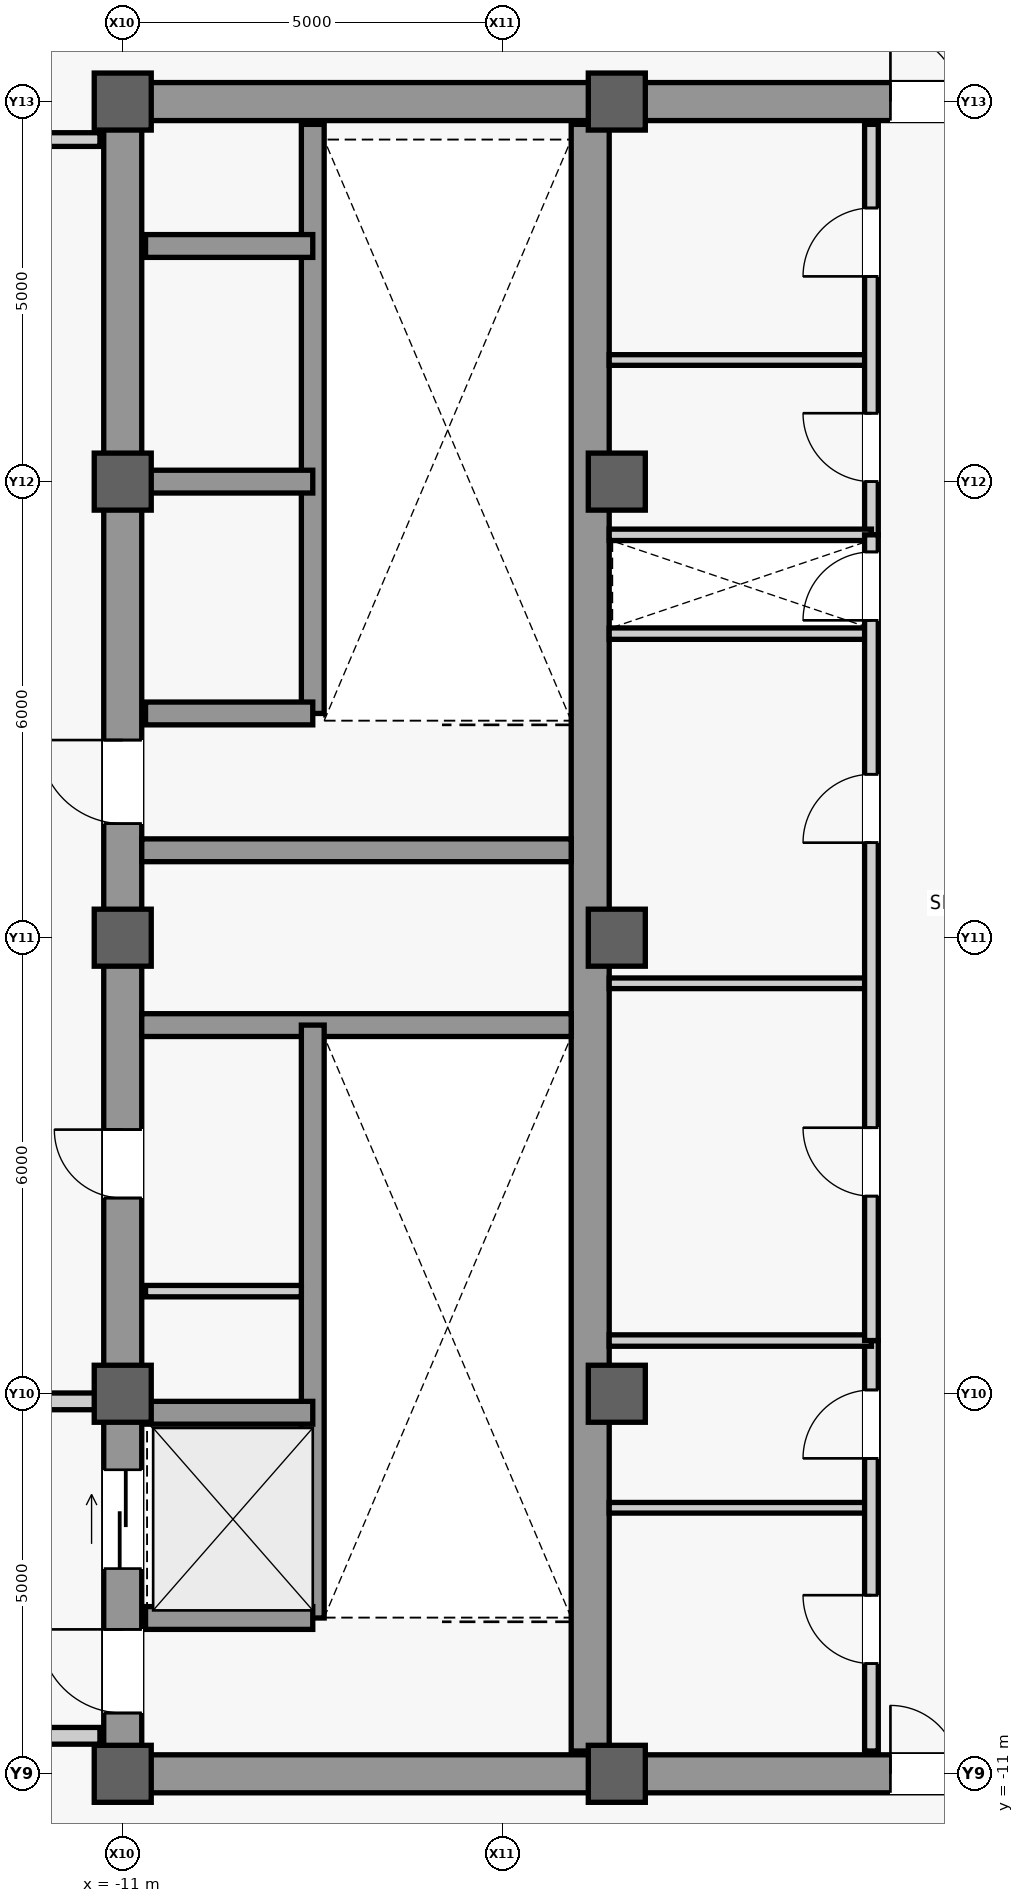
"""IFC4 building model, lengths in metres.
Left out: names, types, materials, properties, quantities, classifications, styles, units other than length and angle.
Written with IfcOpenShell. Run it as: python <this file> out.ifc"""

import sys

from ifc_helpers import new_model, si_unit, direction, frame, frame_2d, origin, origin_2d, place, context, subcontext, project, spatial, rectangle, extrude, source, transform, mapped, element, fill, save


model = new_model("IFC4")
c1 = context("Model", 3, precision=1e-05, world=origin(), true_north=direction((0.0, 1.0)))
c2 = subcontext(c1, "Body", "Model", "MODEL_VIEW")
j1 = project(units=[si_unit("LENGTHUNIT", "METRE"), si_unit("PLANEANGLEUNIT", "RADIAN")], contexts=[c1])
p1 = place(None, origin())
s1 = spatial("IfcSite", under=j1, at=p1, CompositionType="ELEMENT")
p2 = place(p1, origin())
s2 = spatial("IfcBuilding", under=s1, at=p2, CompositionType="ELEMENT")
p3 = place(p2, frame((0.0, 0.0, 399.5)))
s3 = spatial("IfcBuildingStorey", under=s2, at=p3, CompositionType="ELEMENT", Elevation=399.5)
m1 = source(origin(), c2, "Body", "SweptSolid", [
    extrude(rectangle(XDim=22.0, YDim=0.5, at=frame_2d((11.0, 0.0))), origin(), (0.0, 0.0, 1.0), 4.5),
])
p4 = place(p3, frame((-11.0, -11.0, 0.0), z_axis=(0.0, 0.0, 1.0), x_axis=(0.0, 1.0, 0.0)))
e1 = element("IfcWall", 1, at=p4, inside=s3, PredefinedType="SHEAR", context=c2, shape_type="MappedRepresentation", body=[
    mapped(m1, transform((0.0, 0.0, 0.0), scale=1.0)),
])
m2 = source(origin(), c2, "Body", "SweptSolid", [
    extrude(rectangle(XDim=1.1, YDim=2.2, at=frame_2d((0.55, 1.1))), frame((0.0, 0.26, 0.0), z_axis=(0.0, -1.0, 0.0), x_axis=(1.0, 0.0, 0.0)), (0.0, 0.0, 1.0), 0.52),
])
p5 = place(p4, frame((0.8, 0.0, 0.0)))
e2 = element("IfcOpeningElement", 2, at=p5, cuts=e1, PredefinedType="OPENING", context=c2, shape_type="MappedRepresentation", body=[
    mapped(m2, transform((0.0, 0.0, 0.0), scale=1.0)),
])
p6 = place(p4, frame((12.5, 0.0, 0.0)))
e3 = element("IfcOpeningElement", 3, at=p6, cuts=e1, PredefinedType="OPENING", context=c2, shape_type="MappedRepresentation", body=[
    mapped(m2, transform((0.0, 0.0, 0.0), scale=1.0)),
])
m3 = source(origin(), c2, "Body", "SweptSolid", [
    extrude(rectangle(XDim=0.9, YDim=2.15, at=frame_2d((0.45, 1.075))), frame((0.0, 0.26, 0.0), z_axis=(0.0, -1.0, 0.0), x_axis=(1.0, 0.0, 0.0)), (0.0, 0.0, 1.0), 0.52),
])
p7 = place(p4, frame((7.575, 0.0, 0.0)))
e4 = element("IfcOpeningElement", 4, at=p7, cuts=e1, PredefinedType="OPENING", context=c2, shape_type="MappedRepresentation", body=[
    mapped(m3, transform((0.0, 0.0, 0.0), scale=1.0)),
])
m4 = source(origin(), c2, "Body", "SweptSolid", [
    extrude(rectangle(XDim=1.3, YDim=2.3, at=frame_2d((0.65, 1.15))), frame((0.0, 0.26, 0.0), z_axis=(0.0, -1.0, 0.0), x_axis=(1.0, 0.0, 0.0)), (0.0, 0.0, 1.0), 0.52),
])
p8 = place(p4, frame((2.7, 0.0, 0.0)))
e5 = element("IfcOpeningElement", 5, at=p8, cuts=e1, PredefinedType="OPENING", context=c2, shape_type="MappedRepresentation", body=[
    mapped(m4, transform((0.0, 0.0, 0.0), scale=1.0)),
])
m5 = source(origin(), c2, "Body", "SweptSolid", [
    extrude(rectangle(XDim=21.4, YDim=0.5, at=frame_2d((10.7, 0.0))), origin(), (0.0, 0.0, 1.0), 4.5),
])
p9 = place(p3, frame((-4.85, -10.7, 0.0), z_axis=(0.0, 0.0, 1.0), x_axis=(0.0, 1.0, 0.0)))
e6 = element("IfcWall", 6, at=p9, inside=s3, PredefinedType="SHEAR", context=c2, shape_type="MappedRepresentation", body=[
    mapped(m5, transform((0.0, 0.0, 0.0), scale=1.0)),
])
m6 = source(origin(), c2, "Body", "SweptSolid", [
    extrude(rectangle(XDim=5.9, YDim=0.5, at=frame_2d((2.95, 0.0))), origin(), (0.0, 0.0, 1.0), 4.5),
])
for number, where, z_axis, x_axis in (
    (7, (-10.75, -11.0, 0.0), (0.0, 0.0, 1.0), (1.0, 0.0, 0.0)),
    (8, (-10.75, 11.0, 0.0), (0.0, 0.0, 1.0), (1.0, 0.0, 0.0)),
):
    element("IfcWall", number, at=place(p3, frame(where, z_axis=z_axis, x_axis=x_axis)), inside=s3, PredefinedType="SHEAR", context=c2, shape_type="MappedRepresentation", body=[
        mapped(m6, transform((0.0, 0.0, 0.0), scale=1.0)),
    ])
m7 = source(origin(), c2, "Body", "SweptSolid", [
    extrude(rectangle(XDim=5.65, YDim=0.3, at=frame_2d((2.825, 0.0))), origin(), (0.0, 0.0, 1.0), 4.5),
])
for number, where, z_axis, x_axis in (
    (9, (-10.75, -1.15, 0.0), (0.0, 0.0, 1.0), (1.0, 0.0, 0.0)),
    (10, (-10.75, 1.15, 0.0), (0.0, 0.0, 1.0), (1.0, 0.0, 0.0)),
):
    element("IfcWall", number, at=place(p3, frame(where, z_axis=z_axis, x_axis=x_axis)), inside=s3, PredefinedType="SHEAR", context=c2, shape_type="MappedRepresentation", body=[
        mapped(m7, transform((0.0, 0.0, 0.0), scale=1.0)),
    ])
m8 = source(origin(), c2, "Body", "SweptSolid", [
    extrude(rectangle(XDim=9.2, YDim=0.5, at=frame_2d((4.6, 0.0))), origin(), (0.0, 0.0, 1.0), 4.5),
])
p10 = place(p3, frame((-4.6, -11.0, 0.0), z_axis=(0.0, 0.0, 1.0), x_axis=(1.0, 0.0, 0.0)))
e11 = element("IfcWall", 11, at=p10, inside=s3, PredefinedType="SHEAR", context=c2, shape_type="MappedRepresentation", body=[
    mapped(m8, transform((0.0, 0.0, 0.0), scale=1.0)),
])
m9 = source(origin(), c2, "Body", "SweptSolid", [
    extrude(rectangle(XDim=1.8, YDim=2.25, at=frame_2d((0.9, 1.125))), frame((0.0, 0.26, 0.0), z_axis=(0.0, -1.0, 0.0), x_axis=(1.0, 0.0, 0.0)), (0.0, 0.0, 1.0), 0.52),
])
p11 = place(p10, frame((3.7, 0.0, 0.0)))
e12 = element("IfcOpeningElement", 12, at=p11, cuts=e11, PredefinedType="OPENING", context=c2, shape_type="MappedRepresentation", body=[
    mapped(m9, transform((0.0, 0.0, 0.0), scale=1.0)),
])
p12 = place(p3, frame((-4.6, 11.0, 0.0), z_axis=(0.0, 0.0, 1.0), x_axis=(1.0, 0.0, 0.0)))
e13 = element("IfcWall", 13, at=p12, inside=s3, PredefinedType="SHEAR", context=c2, shape_type="MappedRepresentation", body=[
    mapped(m8, transform((0.0, 0.0, 0.0), scale=1.0)),
])
p13 = place(p12, frame((3.7, 0.0, 0.0)))
e14 = element("IfcOpeningElement", 14, at=p13, cuts=e13, PredefinedType="OPENING", context=c2, shape_type="MappedRepresentation", body=[
    mapped(m9, transform((0.0, 0.0, 0.0), scale=1.0)),
])
m10 = source(origin(), c2, "Body", "SweptSolid", [
    extrude(rectangle(XDim=0.75, YDim=0.75, at=origin_2d()), origin(), (0.0, 0.0, 1.0), 4.8),
])
for number, where, z_axis, x_axis in (
    (15, (-11.0, -11.0, 0.0), (0.0, 0.0, 1.0), (1.0, 0.0, 0.0)),
    (16, (-11.0, -6.0, 0.0), (0.0, 0.0, 1.0), (1.0, 0.0, 0.0)),
    (17, (-11.0, 0.0, 0.0), (0.0, 0.0, 1.0), (1.0, 0.0, 0.0)),
    (18, (-11.0, 6.0, 0.0), (0.0, 0.0, 1.0), (1.0, 0.0, 0.0)),
    (19, (-11.0, 11.0, 0.0), (0.0, 0.0, 1.0), (1.0, 0.0, 0.0)),
    (20, (-4.5, -11.0, 0.0), (0.0, 0.0, 1.0), (1.0, 0.0, 0.0)),
    (21, (-4.5, -6.0, 0.0), (0.0, 0.0, 1.0), (1.0, 0.0, 0.0)),
    (22, (-4.5, 0.0, 0.0), (0.0, 0.0, 1.0), (1.0, 0.0, 0.0)),
    (23, (-4.5, 6.0, 0.0), (0.0, 0.0, 1.0), (1.0, 0.0, 0.0)),
    (24, (-4.5, 11.0, 0.0), (0.0, 0.0, 1.0), (1.0, 0.0, 0.0)),
):
    element("IfcColumn", number, at=place(p3, frame(where, z_axis=z_axis, x_axis=x_axis)), inside=s3, PredefinedType="COLUMN", context=c2, shape_type="MappedRepresentation", body=[
        mapped(m10, transform((0.0, 0.0, 0.0), scale=1.0)),
    ])
m11 = source(origin(), c2, "Body", "SweptSolid", [
    extrude(rectangle(XDim=7.8, YDim=0.3, at=frame_2d((3.9, 0.0))), origin(), (0.0, 0.0, 1.0), 4.5),
])
p14 = place(p3, frame((-8.5, -8.95, 0.0), z_axis=(0.0, 0.0, 1.0), x_axis=(0.0, 1.0, 0.0)))
e25 = element("IfcWall", 25, at=p14, inside=s3, PredefinedType="SHEAR", context=c2, shape_type="MappedRepresentation", body=[
    mapped(m11, transform((0.0, 0.0, 0.0), scale=1.0)),
])
m12 = source(origin(), c2, "Body", "SweptSolid", [
    extrude(rectangle(XDim=2.2, YDim=0.3, at=frame_2d((1.1, 0.0))), origin(), (0.0, 0.0, 1.0), 4.5),
])
for number, where, z_axis, x_axis in (
    (26, (-10.7, -8.95, 0.0), (0.0, 0.0, 1.0), (1.0, 0.0, 0.0)),
    (27, (-10.7, -6.25, 0.0), (0.0, 0.0, 1.0), (1.0, 0.0, 0.0)),
):
    element("IfcWall", number, at=place(p3, frame(where, z_axis=z_axis, x_axis=x_axis)), inside=s3, PredefinedType="SHEAR", context=c2, shape_type="MappedRepresentation", body=[
        mapped(m12, transform((0.0, 0.0, 0.0), scale=1.0)),
    ])
m13 = source(origin(), c2, "Body", "SweptSolid", [
    extrude(rectangle(XDim=7.75, YDim=0.3, at=frame_2d((3.875, 0.0))), origin(), (0.0, 0.0, 1.0), 4.5),
])
p15 = place(p3, frame((-8.5, 2.95, 0.0), z_axis=(0.0, 0.0, 1.0), x_axis=(0.0, 1.0, 0.0)))
e28 = element("IfcWall", 28, at=p15, inside=s3, PredefinedType="SHEAR", context=c2, shape_type="MappedRepresentation", body=[
    mapped(m13, transform((0.0, 0.0, 0.0), scale=1.0)),
])
for number, where, z_axis, x_axis in (
    (29, (-10.7, 2.95, 0.0), (0.0, 0.0, 1.0), (1.0, 0.0, 0.0)),
    (30, (-10.7, 6.0, 0.0), (0.0, 0.0, 1.0), (1.0, 0.0, 0.0)),
    (31, (-10.7, 9.1, 0.0), (0.0, 0.0, 1.0), (1.0, 0.0, 0.0)),
):
    element("IfcWall", number, at=place(p3, frame(where, z_axis=z_axis, x_axis=x_axis)), inside=s3, PredefinedType="SHEAR", context=c2, shape_type="MappedRepresentation", body=[
        mapped(m12, transform((0.0, 0.0, 0.0), scale=1.0)),
    ])
m14 = source(origin(), c2, "Body", "SweptSolid", [
    extrude(rectangle(XDim=2.05, YDim=0.15, at=frame_2d((1.025, 0.0))), origin(), (0.0, 0.0, 1.0), 4.5),
])
p16 = place(p3, frame((-10.7, -4.65, 0.0), z_axis=(0.0, 0.0, 1.0), x_axis=(1.0, 0.0, 0.0)))
e32 = element("IfcWall", 32, at=p16, inside=s3, PredefinedType="PARTITIONING", context=c2, shape_type="MappedRepresentation", body=[
    mapped(m14, transform((0.0, 0.0, 0.0), scale=1.0)),
])
m15 = source(origin(), c2, "Body", "SweptSolid", [
    extrude(rectangle(XDim=4.05, YDim=0.22, at=frame_2d((2.025, 0.0))), origin(), (0.0, 0.0, 1.0), 4.5),
])
p17 = place(p3, frame((-15.35, -10.5, 0.0), z_axis=(0.0, 0.0, 1.0), x_axis=(1.0, 0.0, 0.0)))
e33 = element("IfcWall", 33, at=p17, inside=s3, PredefinedType="PARTITIONING", context=c2, shape_type="MappedRepresentation", body=[
    mapped(m15, transform((0.0, 0.0, 0.0), scale=1.0)),
])
m16 = source(origin(), c2, "Body", "SweptSolid", [
    extrude(rectangle(XDim=4.05, YDim=0.22, at=frame_2d((2.025, 0.0))), origin(), (0.0, 0.0, 1.0), 3.951),
])
p18 = place(p3, frame((-15.35, -6.1, 0.0), z_axis=(0.0, 0.0, 1.0), x_axis=(1.0, 0.0, 0.0)))
e34 = element("IfcWall", 34, at=p18, inside=s3, PredefinedType="PARTITIONING", context=c2, shape_type="MappedRepresentation", body=[
    mapped(m16, transform((0.0, 0.0, 0.0), scale=1.0)),
])
m17 = source(origin(), c2, "Body", "SweptSolid", [
    extrude(rectangle(XDim=4.05, YDim=0.18, at=frame_2d((2.025, 0.0))), origin(), (0.0, 0.0, 1.0), 4.5),
])
p19 = place(p3, frame((-15.35, 10.5, 0.0), z_axis=(0.0, 0.0, 1.0), x_axis=(1.0, 0.0, 0.0)))
e35 = element("IfcWall", 35, at=p19, inside=s3, PredefinedType="PARTITIONING", context=c2, shape_type="MappedRepresentation", body=[
    mapped(m17, transform((0.0, 0.0, 0.0), scale=1.0)),
])
m18 = source(origin(), c2, "Body", "SweptSolid", [
    extrude(rectangle(XDim=3.45, YDim=0.15, at=frame_2d((1.725, 0.0))), origin(), (0.0, 0.0, 1.0), 4.5),
])
p20 = place(p3, frame((-4.6, 4.0, 0.0), z_axis=(0.0, 0.0, 1.0), x_axis=(1.0, 0.0, 0.0)))
e36 = element("IfcWall", 36, at=p20, inside=s3, PredefinedType="PARTITIONING", context=c2, shape_type="MappedRepresentation", body=[
    mapped(m18, transform((0.0, 0.0, 0.0), scale=1.0)),
])
m19 = source(origin(), c2, "Body", "SweptSolid", [
    extrude(rectangle(XDim=3.45, YDim=0.14, at=frame_2d((1.725, 0.0))), origin(), (0.0, 0.0, 1.0), 4.5),
])
p21 = place(p3, frame((-4.6, -7.5, 0.0), z_axis=(0.0, 0.0, 1.0), x_axis=(1.0, 0.0, 0.0)))
e37 = element("IfcWall", 37, at=p21, inside=s3, PredefinedType="PARTITIONING", context=c2, shape_type="MappedRepresentation", body=[
    mapped(m19, transform((0.0, 0.0, 0.0), scale=1.0)),
])
m20 = source(origin(), c2, "Body", "SweptSolid", [
    extrude(rectangle(XDim=5.4, YDim=0.18, at=frame_2d((2.7, 0.0))), origin(), (0.0, 0.0, 1.0), 4.5),
])
p22 = place(p3, frame((-1.15, -10.7, 0.0), z_axis=(0.0, 0.0, 1.0), x_axis=(0.0, 1.0, 0.0)))
e38 = element("IfcWall", 38, at=p22, inside=s3, PredefinedType="PARTITIONING", context=c2, shape_type="MappedRepresentation", body=[
    mapped(m20, transform((0.0, 0.0, 0.0), scale=1.0)),
])
m21 = source(origin(), c2, "Body", "SweptSolid", [
    extrude(rectangle(XDim=0.9, YDim=2.15, at=frame_2d((0.45, 1.075))), frame((0.0, 0.1, 0.0), z_axis=(0.0, -1.0, 0.0), x_axis=(1.0, 0.0, 0.0)), (0.0, 0.0, 1.0), 0.2),
])
p23 = place(p22, frame((1.15, 0.0, 0.0)))
e39 = element("IfcOpeningElement", 39, at=p23, cuts=e38, PredefinedType="OPENING", context=c2, shape_type="MappedRepresentation", body=[
    mapped(m21, transform((0.0, 0.0, 0.0), scale=1.0)),
])
p24 = place(p22, frame((3.85, 0.0, 0.0)))
e40 = element("IfcOpeningElement", 40, at=p24, cuts=e38, PredefinedType="OPENING", context=c2, shape_type="MappedRepresentation", body=[
    mapped(m21, transform((0.0, 0.0, 0.0), scale=1.0)),
])
p25 = place(p3, frame((-4.6, -5.3, 0.0), z_axis=(0.0, 0.0, 1.0), x_axis=(1.0, 0.0, 0.0)))
e41 = element("IfcWall", 41, at=p25, inside=s3, PredefinedType="PARTITIONING", context=c2, shape_type="MappedRepresentation", body=[
    mapped(m18, transform((0.0, 0.0, 0.0), scale=1.0)),
])
p26 = place(p3, frame((-4.6, 7.6, 0.0), z_axis=(0.0, 0.0, 1.0), x_axis=(1.0, 0.0, 0.0)))
e42 = element("IfcWall", 42, at=p26, inside=s3, PredefinedType="PARTITIONING", context=c2, shape_type="MappedRepresentation", body=[
    mapped(m19, transform((0.0, 0.0, 0.0), scale=1.0)),
])
p27 = place(p3, frame((-1.15, 5.3, 0.0), z_axis=(0.0, 0.0, 1.0), x_axis=(0.0, 1.0, 0.0)))
e43 = element("IfcWall", 43, at=p27, inside=s3, PredefinedType="PARTITIONING", context=c2, shape_type="MappedRepresentation", body=[
    mapped(m20, transform((0.0, 0.0, 0.0), scale=1.0)),
])
p28 = place(p27, frame((0.7, 0.0, 0.0)))
e44 = element("IfcOpeningElement", 44, at=p28, cuts=e43, PredefinedType="OPENING", context=c2, shape_type="MappedRepresentation", body=[
    mapped(m21, transform((0.0, 0.0, 0.0), scale=1.0)),
])
p29 = place(p27, frame((3.4, 0.0, 0.0)))
e45 = element("IfcOpeningElement", 45, at=p29, cuts=e43, PredefinedType="OPENING", context=c2, shape_type="MappedRepresentation", body=[
    mapped(m21, transform((0.0, 0.0, 0.0), scale=1.0)),
])
p30 = place(p3, frame((-4.6, 5.3, 0.0), z_axis=(0.0, 0.0, 1.0), x_axis=(1.0, 0.0, 0.0)))
e46 = element("IfcWall", 46, at=p30, inside=s3, PredefinedType="PARTITIONING", context=c2, shape_type="MappedRepresentation", body=[
    mapped(m18, transform((0.0, 0.0, 0.0), scale=1.0)),
])
p31 = place(p3, frame((-4.6, -0.6, 0.0), z_axis=(0.0, 0.0, 1.0), x_axis=(1.0, 0.0, 0.0)))
e47 = element("IfcWall", 47, at=p31, inside=s3, PredefinedType="PARTITIONING", context=c2, shape_type="MappedRepresentation", body=[
    mapped(m19, transform((0.0, 0.0, 0.0), scale=1.0)),
])
m22 = source(origin(), c2, "Body", "SweptSolid", [
    extrude(rectangle(XDim=10.6, YDim=0.18, at=frame_2d((5.3, 0.0))), origin(), (0.0, 0.0, 1.0), 4.5),
])
p32 = place(p3, frame((-1.15, -5.3, 0.0), z_axis=(0.0, 0.0, 1.0), x_axis=(0.0, 1.0, 0.0)))
e48 = element("IfcWall", 48, at=p32, inside=s3, PredefinedType="PARTITIONING", context=c2, shape_type="MappedRepresentation", body=[
    mapped(m22, transform((0.0, 0.0, 0.0), scale=1.0)),
])
p33 = place(p32, frame((1.9, 0.0, 0.0)))
e49 = element("IfcOpeningElement", 49, at=p33, cuts=e48, PredefinedType="OPENING", context=c2, shape_type="MappedRepresentation", body=[
    mapped(m21, transform((0.0, 0.0, 0.0), scale=1.0)),
])
p34 = place(p32, frame((6.55, 0.0, 0.0)))
e50 = element("IfcOpeningElement", 50, at=p34, cuts=e48, PredefinedType="OPENING", context=c2, shape_type="MappedRepresentation", body=[
    mapped(m21, transform((0.0, 0.0, 0.0), scale=1.0)),
])
p35 = place(p32, frame((9.475, 0.0, 0.0)))
e51 = element("IfcOpeningElement", 51, at=p35, cuts=e48, PredefinedType="OPENING", context=c2, shape_type="MappedRepresentation", body=[
    mapped(m21, transform((0.0, 0.0, 0.0), scale=1.0)),
])
m23 = source(origin(), c2, "Body", "SweptSolid", [
    extrude(rectangle(XDim=1.1, YDim=2.2, at=frame_2d((0.55, 1.1))), frame((0.0, 0.025, 0.0), z_axis=(0.0, -1.0, 0.0), x_axis=(1.0, 0.0, 0.0)), (0.0, 0.0, 1.0), 0.05),
])
p36 = place(p5, origin())
e52 = element("IfcDoor", 52, at=p36, inside=s3, OperationType="SINGLE_SWING_RIGHT", PredefinedType="DOOR", context=c2, shape_type="MappedRepresentation", body=[
    mapped(m23, transform((0.0, 0.0, 0.0), scale=1.0)),
])
fill(e2, e52)
p37 = place(p6, origin())
e53 = element("IfcDoor", 53, at=p37, inside=s3, OperationType="SINGLE_SWING_RIGHT", PredefinedType="DOOR", context=c2, shape_type="MappedRepresentation", body=[
    mapped(m23, transform((0.0, 0.0, 0.0), scale=1.0)),
])
fill(e3, e53)
m24 = source(origin(), c2, "Body", "SweptSolid", [
    extrude(rectangle(XDim=0.9, YDim=2.15, at=frame_2d((0.45, 1.075))), frame((0.0, 0.025, 0.0), z_axis=(0.0, -1.0, 0.0), x_axis=(1.0, 0.0, 0.0)), (0.0, 0.0, 1.0), 0.05),
])
p38 = place(p7, origin())
e54 = element("IfcDoor", 54, at=p38, inside=s3, OperationType="SINGLE_SWING_RIGHT", PredefinedType="DOOR", context=c2, shape_type="MappedRepresentation", body=[
    mapped(m24, transform((0.0, 0.0, 0.0), scale=1.0)),
])
fill(e4, e54)
p39 = place(p23, origin())
e55 = element("IfcDoor", 55, at=p39, inside=s3, OperationType="SINGLE_SWING_RIGHT", PredefinedType="DOOR", context=c2, shape_type="MappedRepresentation", body=[
    mapped(m24, transform((0.0, 0.0, 0.0), scale=1.0)),
])
fill(e39, e55)
p40 = place(p24, origin())
e56 = element("IfcDoor", 56, at=p40, inside=s3, OperationType="SINGLE_SWING_LEFT", PredefinedType="DOOR", context=c2, shape_type="MappedRepresentation", body=[
    mapped(m24, transform((0.0, 0.0, 0.0), scale=1.0)),
])
fill(e40, e56)
m25 = source(origin(), c2, "Body", "SweptSolid", [
    extrude(rectangle(XDim=1.8, YDim=2.25, at=frame_2d((0.9, 1.125))), frame((0.0, 0.025, 0.0), z_axis=(0.0, -1.0, 0.0), x_axis=(1.0, 0.0, 0.0)), (0.0, 0.0, 1.0), 0.05),
])
p41 = place(p11, origin())
e57 = element("IfcDoor", 57, at=p41, inside=s3, OperationType="SINGLE_SWING_LEFT", PredefinedType="DOOR", context=c2, shape_type="MappedRepresentation", body=[
    mapped(m25, transform((0.0, 0.0, 0.0), scale=1.0)),
])
fill(e12, e57)
p42 = place(p28, origin())
e58 = element("IfcDoor", 58, at=p42, inside=s3, OperationType="SINGLE_SWING_RIGHT", PredefinedType="DOOR", context=c2, shape_type="MappedRepresentation", body=[
    mapped(m24, transform((0.0, 0.0, 0.0), scale=1.0)),
])
fill(e44, e58)
p43 = place(p29, origin())
e59 = element("IfcDoor", 59, at=p43, inside=s3, OperationType="SINGLE_SWING_LEFT", PredefinedType="DOOR", context=c2, shape_type="MappedRepresentation", body=[
    mapped(m24, transform((0.0, 0.0, 0.0), scale=1.0)),
])
fill(e45, e59)
p44 = place(p13, origin())
e60 = element("IfcDoor", 60, at=p44, inside=s3, OperationType="SINGLE_SWING_RIGHT", PredefinedType="DOOR", context=c2, shape_type="MappedRepresentation", body=[
    mapped(m25, transform((0.0, 0.0, 0.0), scale=1.0)),
])
fill(e14, e60)
p45 = place(p33, origin())
e61 = element("IfcDoor", 61, at=p45, inside=s3, OperationType="SINGLE_SWING_RIGHT", PredefinedType="DOOR", context=c2, shape_type="MappedRepresentation", body=[
    mapped(m24, transform((0.0, 0.0, 0.0), scale=1.0)),
])
fill(e49, e61)
p46 = place(p34, origin())
e62 = element("IfcDoor", 62, at=p46, inside=s3, OperationType="SINGLE_SWING_LEFT", PredefinedType="DOOR", context=c2, shape_type="MappedRepresentation", body=[
    mapped(m24, transform((0.0, 0.0, 0.0), scale=1.0)),
])
fill(e50, e62)
p47 = place(p35, origin())
e63 = element("IfcDoor", 63, at=p47, inside=s3, OperationType="SINGLE_SWING_LEFT", PredefinedType="DOOR", context=c2, shape_type="MappedRepresentation", body=[
    mapped(m24, transform((0.0, 0.0, 0.0), scale=1.0)),
])
fill(e51, e63)
m26 = source(origin(), c2, "Body", "SweptSolid", [
    extrude(rectangle(XDim=1.3, YDim=2.3, at=frame_2d((0.65, 1.15))), frame((0.0, 0.025, 0.0), z_axis=(0.0, -1.0, 0.0), x_axis=(1.0, 0.0, 0.0)), (0.0, 0.0, 1.0), 0.05),
])
p48 = place(p8, origin())
e64 = element("IfcDoor", 64, at=p48, inside=s3, OperationType="SLIDING_TO_LEFT", PredefinedType="DOOR", context=c2, shape_type="MappedRepresentation", body=[
    mapped(m26, transform((0.0, 0.0, 0.0), scale=1.0)),
])
fill(e5, e64)
save(model, sys.argv[1])
